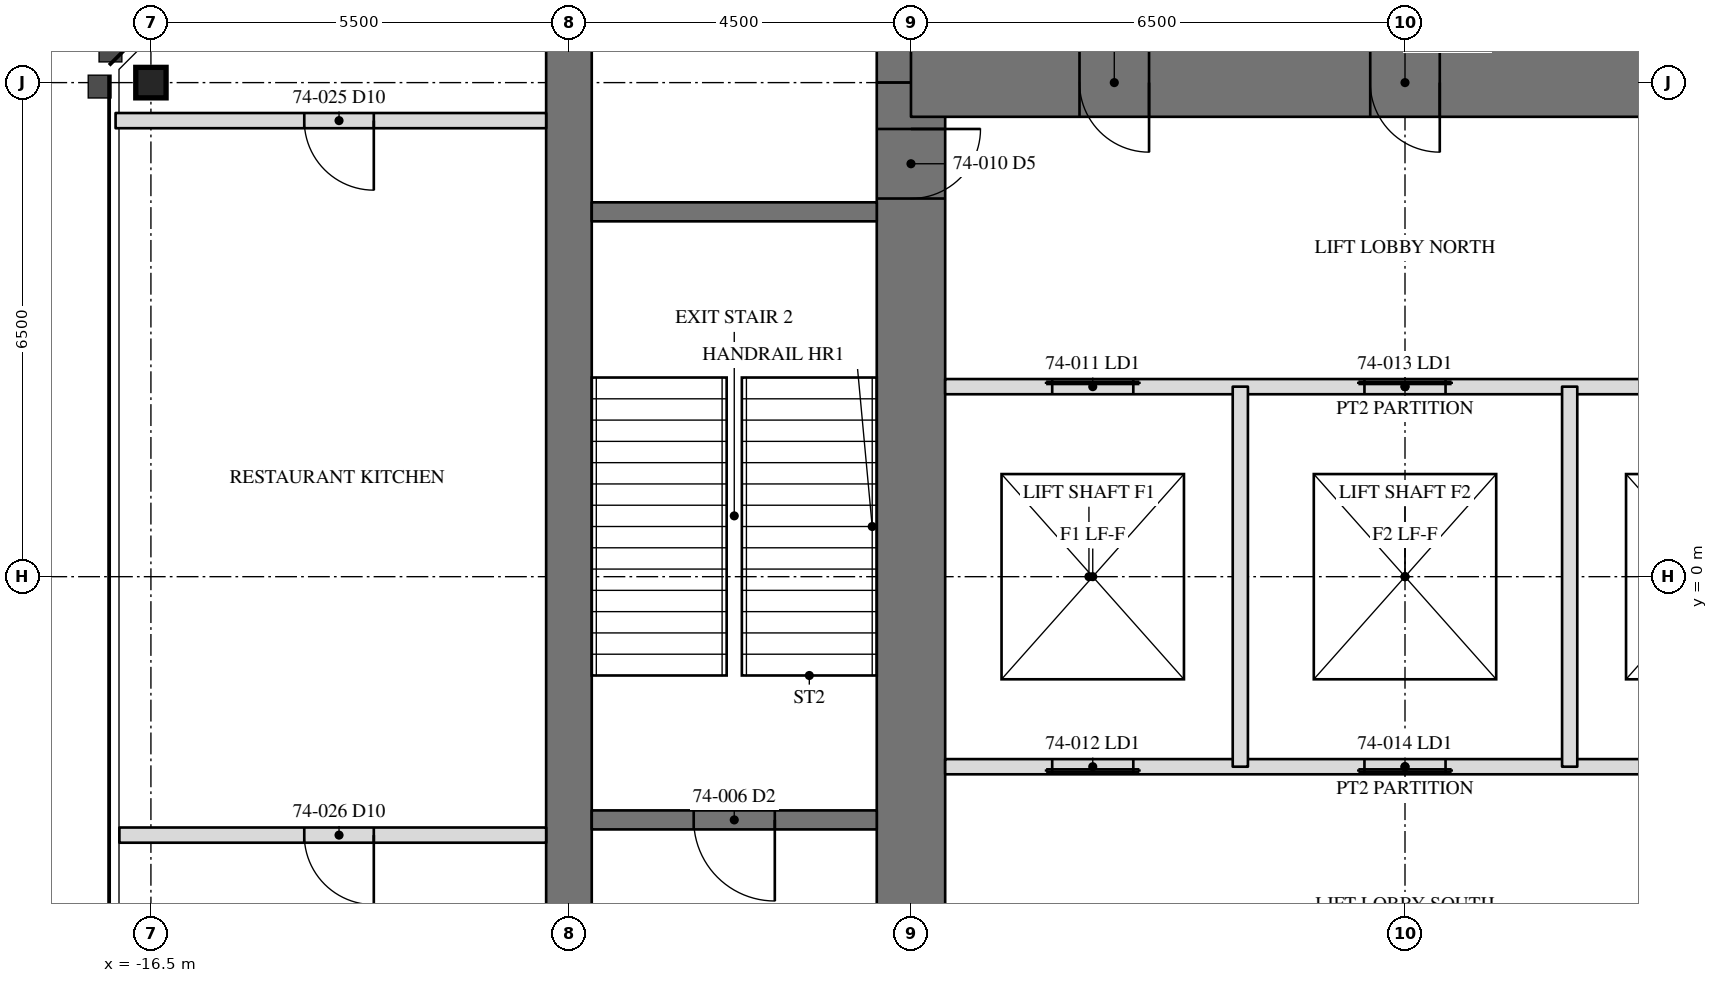
"""IFC4 building model, lengths in metres.
Left out: names, types, materials, properties, quantities, classifications, styles, units other than length and angle.
Written with IfcOpenShell. Run it as: python <this file> out.ifc"""

import sys

from ifc_helpers import new_model, si_unit, direction, frame, frame_2d, origin, origin_2d, place, context, subcontext, project, spatial, rectangle, i_section, extrude, element, fill, save


model = new_model("IFC4")
c1 = context("Model", 3, precision=1e-05, world=origin(), true_north=direction((0.0, 1.0)))
c2 = subcontext(c1, "Body", "Model", "MODEL_VIEW")
j1 = project(units=[si_unit("LENGTHUNIT", "METRE"), si_unit("PLANEANGLEUNIT", "RADIAN")], contexts=[c1])
p1 = place(None, origin())
s1 = spatial("IfcSite", under=j1, at=p1, CompositionType="ELEMENT")
p2 = place(p1, origin())
s2 = spatial("IfcBuilding", under=s1, at=p2, CompositionType="ELEMENT")
p3 = place(p2, frame((0.0, 0.0, 299.2)))
s3 = spatial("IfcBuildingStorey", under=s2, at=p3, CompositionType="ELEMENT", Elevation=299.2)
p4 = place(p3, frame((-16.5, 6.5, 0.0), z_axis=(0.0, 0.0, 1.0), x_axis=(0.0, 1.0, 0.0)))
e1 = element("IfcColumn", 1, at=p4, inside=s3, PredefinedType="COLUMN", context=c2, shape_type="SweptSolid", body=[
    extrude(i_section(OverallWidth=0.401, OverallDepth=0.399, WebThickness=0.025, FlangeThickness=0.04, at=origin_2d()), origin(), (0.0, 0.0, 1.0), 5.0),
])
p5 = place(p3, frame((-11.0, 11.0, 0.0), z_axis=(0.0, 0.0, 1.0), x_axis=(0.0, -1.0, 0.0)))
e2 = element("IfcWall", 2, at=p5, inside=s3, PredefinedType="SHEAR", context=c2, shape_type="SweptSolid", body=[
    extrude(rectangle(XDim=22.0, YDim=0.6, at=frame_2d((11.0, 0.0))), origin(), (0.0, 0.0, 1.0), 5.0),
])
p6 = place(p5, frame((15.393, 0.0, 0.0)))
e3 = element("IfcOpeningElement", 3, at=p6, cuts=e2, PredefinedType="OPENING", context=c2, shape_type="SweptSolid", body=[
    extrude(rectangle(XDim=0.915, YDim=2.134, at=frame_2d((0.458, 1.067))), frame((0.0, 0.31, 0.0), z_axis=(0.0, -1.0, 0.0), x_axis=(1.0, 0.0, 0.0)), (0.0, 0.0, 1.0), 0.62),
])
p7 = place(p3, frame((-6.5, 11.0, 0.0), z_axis=(0.0, 0.0, 1.0), x_axis=(0.0, -1.0, 0.0)))
e4 = element("IfcWall", 4, at=p7, inside=s3, PredefinedType="SHEAR", context=c2, shape_type="SweptSolid", body=[
    extrude(rectangle(XDim=4.5, YDim=0.9, at=frame_2d((2.25, 0.0))), origin(), (0.0, 0.0, 1.0), 5.0),
])
p8 = place(p3, frame((-6.5, 6.5, 0.0), z_axis=(0.0, 0.0, 1.0), x_axis=(0.0, -1.0, 0.0)))
e5 = element("IfcWall", 5, at=p8, inside=s3, PredefinedType="SHEAR", context=c2, shape_type="SweptSolid", body=[
    extrude(rectangle(XDim=13.0, YDim=0.9, at=frame_2d((6.5, 0.0))), origin(), (0.0, 0.0, 1.0), 5.0),
])
p9 = place(p8, frame((10.893, 0.0, 0.0)))
e6 = element("IfcOpeningElement", 6, at=p9, cuts=e5, PredefinedType="OPENING", context=c2, shape_type="SweptSolid", body=[
    extrude(rectangle(XDim=0.915, YDim=2.134, at=frame_2d((0.458, 1.067))), frame((0.0, 0.46, 0.0), z_axis=(0.0, -1.0, 0.0), x_axis=(1.0, 0.0, 0.0)), (0.0, 0.0, 1.0), 0.92),
])
p10 = place(p8, frame((0.61, 0.0, 0.0)))
e7 = element("IfcOpeningElement", 7, at=p10, cuts=e5, PredefinedType="OPENING", context=c2, shape_type="SweptSolid", body=[
    extrude(rectangle(XDim=0.915, YDim=2.134, at=frame_2d((0.458, 1.067))), frame((0.0, 0.46, 0.0), z_axis=(0.0, -1.0, 0.0), x_axis=(1.0, 0.0, 0.0)), (0.0, 0.0, 1.0), 0.92),
])
p11 = place(p3, frame((6.5, 6.5, 0.0), z_axis=(0.0, 0.0, 1.0), x_axis=(-1.0, 0.0, 0.0)))
e8 = element("IfcWall", 8, at=p11, inside=s3, PredefinedType="SHEAR", context=c2, shape_type="SweptSolid", body=[
    extrude(rectangle(XDim=13.0, YDim=0.9, at=frame_2d((6.5, 0.0))), origin(), (0.0, 0.0, 1.0), 5.0),
])
p12 = place(p11, frame((6.042, 0.0, 0.0)))
e9 = element("IfcOpeningElement", 9, at=p12, cuts=e8, PredefinedType="OPENING", context=c2, shape_type="SweptSolid", body=[
    extrude(rectangle(XDim=0.915, YDim=2.134, at=frame_2d((0.458, 1.067))), frame((0.0, 0.46, 0.0), z_axis=(0.0, -1.0, 0.0), x_axis=(1.0, 0.0, 0.0)), (0.0, 0.0, 1.0), 0.92),
])
p13 = place(p11, frame((9.867, 0.0, 0.0)))
e10 = element("IfcOpeningElement", 10, at=p13, cuts=e8, PredefinedType="OPENING", context=c2, shape_type="SweptSolid", body=[
    extrude(rectangle(XDim=0.915, YDim=2.134, at=frame_2d((0.458, 1.067))), frame((0.0, 0.46, 0.0), z_axis=(0.0, -1.0, 0.0), x_axis=(1.0, 0.0, 0.0)), (0.0, 0.0, 1.0), 0.92),
])
p14 = place(p11, frame((2.218, 0.0, 0.0)))
e11 = element("IfcOpeningElement", 11, at=p14, cuts=e8, PredefinedType="OPENING", context=c2, shape_type="SweptSolid", body=[
    extrude(rectangle(XDim=0.915, YDim=2.134, at=frame_2d((0.458, 1.067))), frame((0.0, 0.46, 0.0), z_axis=(0.0, -1.0, 0.0), x_axis=(1.0, 0.0, 0.0)), (0.0, 0.0, 1.0), 0.92),
])
p15 = place(p3, frame((-6.95, 4.8, 0.0), z_axis=(0.0, 0.0, 1.0), x_axis=(-1.0, 0.0, 0.0)))
e12 = element("IfcWall", 12, at=p15, inside=s3, PredefinedType="SOLIDWALL", context=c2, shape_type="SweptSolid", body=[
    extrude(rectangle(XDim=3.75, YDim=0.25, at=frame_2d((1.875, 0.0))), origin(), (0.0, 0.0, 1.0), 4.81),
])
p16 = place(p3, frame((-6.95, -3.2, 0.0), z_axis=(0.0, 0.0, 1.0), x_axis=(-1.0, 0.0, 0.0)))
e13 = element("IfcWall", 13, at=p16, inside=s3, PredefinedType="SOLIDWALL", context=c2, shape_type="SweptSolid", body=[
    extrude(rectangle(XDim=3.75, YDim=0.25, at=frame_2d((1.875, 0.0))), origin(), (0.0, 0.0, 1.0), 4.81),
])
p17 = place(p16, frame((1.342, 0.0, 0.0)))
e14 = element("IfcOpeningElement", 14, at=p17, cuts=e13, PredefinedType="OPENING", context=c2, shape_type="SweptSolid", body=[
    extrude(rectangle(XDim=1.067, YDim=2.134, at=frame_2d((0.533, 1.067))), frame((0.0, 0.135, 0.0), z_axis=(0.0, -1.0, 0.0), x_axis=(1.0, 0.0, 0.0)), (0.0, 0.0, 1.0), 0.27),
])
p18 = place(p3, frame((-6.05, 2.5, 0.0), z_axis=(0.0, 0.0, 1.0), x_axis=(1.0, 0.0, 0.0)))
e15 = element("IfcWall", 15, at=p18, inside=s3, PredefinedType="PARTITIONING", context=c2, shape_type="SweptSolid", body=[
    extrude(rectangle(XDim=12.1, YDim=0.2, at=frame_2d((6.05, 0.0))), origin(), (0.0, 0.0, 1.0), 4.81),
])
p19 = place(p18, frame((1.408, 0.0, 0.0)))
e16 = element("IfcOpeningElement", 16, at=p19, cuts=e15, PredefinedType="OPENING", context=c2, shape_type="SweptSolid", body=[
    extrude(rectangle(XDim=1.067, YDim=2.134, at=frame_2d((0.533, 1.067))), frame((0.0, 0.11, 0.0), z_axis=(0.0, -1.0, 0.0), x_axis=(1.0, 0.0, 0.0)), (0.0, 0.0, 1.0), 0.22),
])
p20 = place(p18, frame((5.517, 0.0, 0.0)))
e17 = element("IfcOpeningElement", 17, at=p20, cuts=e15, PredefinedType="OPENING", context=c2, shape_type="SweptSolid", body=[
    extrude(rectangle(XDim=1.067, YDim=2.134, at=frame_2d((0.533, 1.067))), frame((0.0, 0.11, 0.0), z_axis=(0.0, -1.0, 0.0), x_axis=(1.0, 0.0, 0.0)), (0.0, 0.0, 1.0), 0.22),
])
p21 = place(p18, frame((9.625, 0.0, 0.0)))
e18 = element("IfcOpeningElement", 18, at=p21, cuts=e15, PredefinedType="OPENING", context=c2, shape_type="SweptSolid", body=[
    extrude(rectangle(XDim=1.067, YDim=2.134, at=frame_2d((0.533, 1.067))), frame((0.0, 0.11, 0.0), z_axis=(0.0, -1.0, 0.0), x_axis=(1.0, 0.0, 0.0)), (0.0, 0.0, 1.0), 0.22),
])
p22 = place(p3, frame((6.05, -2.5, 0.0), z_axis=(0.0, 0.0, 1.0), x_axis=(-1.0, 0.0, 0.0)))
e19 = element("IfcWall", 19, at=p22, inside=s3, PredefinedType="PARTITIONING", context=c2, shape_type="SweptSolid", body=[
    extrude(rectangle(XDim=12.1, YDim=0.2, at=frame_2d((6.05, 0.0))), origin(), (0.0, 0.0, 1.0), 4.81),
])
p23 = place(p22, frame((9.625, 0.0, 0.0)))
e20 = element("IfcOpeningElement", 20, at=p23, cuts=e19, PredefinedType="OPENING", context=c2, shape_type="SweptSolid", body=[
    extrude(rectangle(XDim=1.067, YDim=2.134, at=frame_2d((0.533, 1.067))), frame((0.0, 0.11, 0.0), z_axis=(0.0, -1.0, 0.0), x_axis=(1.0, 0.0, 0.0)), (0.0, 0.0, 1.0), 0.22),
])
p24 = place(p22, frame((5.517, 0.0, 0.0)))
e21 = element("IfcOpeningElement", 21, at=p24, cuts=e19, PredefinedType="OPENING", context=c2, shape_type="SweptSolid", body=[
    extrude(rectangle(XDim=1.067, YDim=2.134, at=frame_2d((0.533, 1.067))), frame((0.0, 0.11, 0.0), z_axis=(0.0, -1.0, 0.0), x_axis=(1.0, 0.0, 0.0)), (0.0, 0.0, 1.0), 0.22),
])
p25 = place(p22, frame((1.408, 0.0, 0.0)))
e22 = element("IfcOpeningElement", 22, at=p25, cuts=e19, PredefinedType="OPENING", context=c2, shape_type="SweptSolid", body=[
    extrude(rectangle(XDim=1.067, YDim=2.134, at=frame_2d((0.533, 1.067))), frame((0.0, 0.11, 0.0), z_axis=(0.0, -1.0, 0.0), x_axis=(1.0, 0.0, 0.0)), (0.0, 0.0, 1.0), 0.22),
])
for number, where, z_axis, x_axis in (
    (23, (-2.167, -2.5, 0.0), (0.0, 0.0, 1.0), (0.0, 1.0, 0.0)),
    (24, (2.167, -2.5, 0.0), (0.0, 0.0, 1.0), (0.0, 1.0, 0.0)),
):
    element("IfcWall", number, at=place(p3, frame(where, z_axis=z_axis, x_axis=x_axis)), inside=s3, PredefinedType="PARTITIONING", context=c2, shape_type="SweptSolid", body=[
        extrude(rectangle(XDim=5.0, YDim=0.2, at=frame_2d((2.5, 0.0))), origin(), (0.0, 0.0, 1.0), 4.81),
    ])
p26 = place(p3, frame((-11.3, 6.0, 0.0), z_axis=(0.0, 0.0, 1.0), x_axis=(-1.0, 0.0, 0.0)))
e25 = element("IfcWall", 25, at=p26, inside=s3, PredefinedType="PARTITIONING", context=c2, shape_type="SweptSolid", body=[
    extrude(rectangle(XDim=5.665, YDim=0.2, at=frame_2d((2.833, 0.0))), origin(), (0.0, 0.0, 1.0), 4.81),
])
p27 = place(p26, frame((2.268, 0.0, 0.0)))
e26 = element("IfcOpeningElement", 26, at=p27, cuts=e25, PredefinedType="OPENING", context=c2, shape_type="SweptSolid", body=[
    extrude(rectangle(XDim=0.915, YDim=2.134, at=frame_2d((0.458, 1.067))), frame((0.0, 0.11, 0.0), z_axis=(0.0, -1.0, 0.0), x_axis=(1.0, 0.0, 0.0)), (0.0, 0.0, 1.0), 0.22),
])
p28 = place(p3, frame((-11.3, -3.4, 0.0), z_axis=(0.0, 0.0, 1.0), x_axis=(-1.0, 0.0, 0.0)))
e27 = element("IfcWall", 27, at=p28, inside=s3, PredefinedType="PARTITIONING", context=c2, shape_type="SweptSolid", body=[
    extrude(rectangle(XDim=5.615, YDim=0.2, at=frame_2d((2.808, 0.0))), origin(), (0.0, 0.0, 1.0), 4.109),
])
p29 = place(p28, frame((2.268, 0.0, 0.0)))
e28 = element("IfcOpeningElement", 28, at=p29, cuts=e27, PredefinedType="OPENING", context=c2, shape_type="SweptSolid", body=[
    extrude(rectangle(XDim=0.915, YDim=2.134, at=frame_2d((0.458, 1.067))), frame((0.0, 0.11, 0.0), z_axis=(0.0, -1.0, 0.0), x_axis=(1.0, 0.0, 0.0)), (0.0, 0.0, 1.0), 0.22),
])
p30 = place(p17, origin())
e29 = element("IfcDoor", 29, at=p30, inside=s3, OperationType="SINGLE_SWING_LEFT", PredefinedType="DOOR", context=c2, shape_type="SweptSolid", body=[
    extrude(rectangle(XDim=1.067, YDim=2.134, at=frame_2d((0.533, 1.067))), frame((0.0, 0.025, 0.0), z_axis=(0.0, -1.0, 0.0), x_axis=(1.0, 0.0, 0.0)), (0.0, 0.0, 1.0), 0.05),
])
fill(e14, e29)
p31 = place(p10, origin())
e30 = element("IfcDoor", 30, at=p31, inside=s3, OperationType="SINGLE_SWING_RIGHT", PredefinedType="DOOR", context=c2, shape_type="SweptSolid", body=[
    extrude(rectangle(XDim=0.915, YDim=2.134, at=frame_2d((0.458, 1.067))), frame((0.0, -0.375, 0.0), z_axis=(0.0, -1.0, 0.0), x_axis=(1.0, 0.0, 0.0)), (0.0, 0.0, 1.0), 0.05),
])
fill(e7, e30)
p32 = place(p19, origin())
e31 = element("IfcDoor", 31, at=p32, inside=s3, OperationType="SLIDING_TO_LEFT", PredefinedType="DOOR", context=c2, shape_type="SweptSolid", body=[
    extrude(rectangle(XDim=1.067, YDim=2.134, at=frame_2d((0.533, 1.067))), frame((0.0, 0.025, 0.0), z_axis=(0.0, -1.0, 0.0), x_axis=(1.0, 0.0, 0.0)), (0.0, 0.0, 1.0), 0.05),
])
fill(e16, e31)
p33 = place(p23, origin())
e32 = element("IfcDoor", 32, at=p33, inside=s3, OperationType="SLIDING_TO_LEFT", PredefinedType="DOOR", context=c2, shape_type="SweptSolid", body=[
    extrude(rectangle(XDim=1.067, YDim=2.134, at=frame_2d((0.533, 1.067))), frame((0.0, 0.025, 0.0), z_axis=(0.0, -1.0, 0.0), x_axis=(1.0, 0.0, 0.0)), (0.0, 0.0, 1.0), 0.05),
])
fill(e20, e32)
p34 = place(p20, origin())
e33 = element("IfcDoor", 33, at=p34, inside=s3, OperationType="SLIDING_TO_LEFT", PredefinedType="DOOR", context=c2, shape_type="SweptSolid", body=[
    extrude(rectangle(XDim=1.067, YDim=2.134, at=frame_2d((0.533, 1.067))), frame((0.0, 0.025, 0.0), z_axis=(0.0, -1.0, 0.0), x_axis=(1.0, 0.0, 0.0)), (0.0, 0.0, 1.0), 0.05),
])
fill(e17, e33)
p35 = place(p24, origin())
e34 = element("IfcDoor", 34, at=p35, inside=s3, OperationType="SLIDING_TO_LEFT", PredefinedType="DOOR", context=c2, shape_type="SweptSolid", body=[
    extrude(rectangle(XDim=1.067, YDim=2.134, at=frame_2d((0.533, 1.067))), frame((0.0, 0.025, 0.0), z_axis=(0.0, -1.0, 0.0), x_axis=(1.0, 0.0, 0.0)), (0.0, 0.0, 1.0), 0.05),
])
fill(e21, e34)
p36 = place(p12, origin())
e35 = element("IfcDoor", 35, at=p36, inside=s3, OperationType="SINGLE_SWING_RIGHT", PredefinedType="DOOR", context=c2, shape_type="SweptSolid", body=[
    extrude(rectangle(XDim=0.915, YDim=2.134, at=frame_2d((0.458, 1.067))), frame((0.0, -0.375, 0.0), z_axis=(0.0, -1.0, 0.0), x_axis=(1.0, 0.0, 0.0)), (0.0, 0.0, 1.0), 0.05),
])
fill(e9, e35)
p37 = place(p13, origin())
e36 = element("IfcDoor", 36, at=p37, inside=s3, OperationType="SINGLE_SWING_LEFT", PredefinedType="DOOR", context=c2, shape_type="SweptSolid", body=[
    extrude(rectangle(XDim=0.915, YDim=2.134, at=frame_2d((0.458, 1.067))), frame((0.0, -0.375, 0.0), z_axis=(0.0, -1.0, 0.0), x_axis=(1.0, 0.0, 0.0)), (0.0, 0.0, 1.0), 0.05),
])
fill(e10, e36)
p38 = place(p27, origin())
e37 = element("IfcDoor", 37, at=p38, inside=s3, OperationType="SINGLE_SWING_LEFT", PredefinedType="DOOR", context=c2, shape_type="SweptSolid", body=[
    extrude(rectangle(XDim=0.915, YDim=2.134, at=frame_2d((0.458, 1.067))), frame((0.0, 0.025, 0.0), z_axis=(0.0, -1.0, 0.0), x_axis=(1.0, 0.0, 0.0)), (0.0, 0.0, 1.0), 0.05),
])
fill(e26, e37)
p39 = place(p29, origin())
e38 = element("IfcDoor", 38, at=p39, inside=s3, OperationType="SINGLE_SWING_LEFT", PredefinedType="DOOR", context=c2, shape_type="SweptSolid", body=[
    extrude(rectangle(XDim=0.915, YDim=2.134, at=frame_2d((0.458, 1.067))), frame((0.0, 0.025, 0.0), z_axis=(0.0, -1.0, 0.0), x_axis=(1.0, 0.0, 0.0)), (0.0, 0.0, 1.0), 0.05),
])
fill(e28, e38)
save(model, sys.argv[1])
